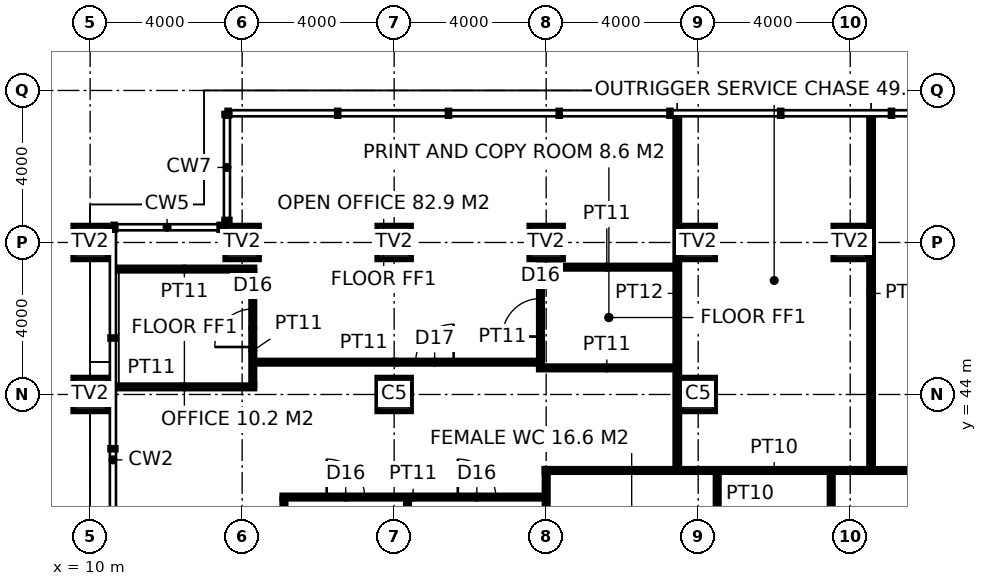
"""IFC4 building model, lengths in metres.
Left out: names, types, materials, properties, quantities, classifications, styles, units other than length and angle.
Written with IfcOpenShell. Run it as: python <this file> out.ifc"""

import sys

from ifc_helpers import new_model, si_unit, direction, frame, frame_2d, origin, origin_2d, place, context, subcontext, project, spatial, rectangle, hollow_rectangle, extrude, element, fill, save


model = new_model("IFC4")
c1 = context("Model", 3, precision=1e-05, world=origin(), true_north=direction((0.0, 1.0)))
c2 = subcontext(c1, "Body", "Model", "MODEL_VIEW")
j1 = project(units=[si_unit("LENGTHUNIT", "METRE"), si_unit("PLANEANGLEUNIT", "RADIAN")], contexts=[c1])
p1 = place(None, origin())
s1 = spatial("IfcSite", under=j1, at=p1, CompositionType="ELEMENT")
p2 = place(p1, origin())
s2 = spatial("IfcBuilding", under=s1, at=p2, CompositionType="ELEMENT")
p3 = place(p2, frame((0.0, 0.0, 105.4)))
s3 = spatial("IfcBuildingStorey", under=s2, at=p3, CompositionType="ELEMENT", Elevation=105.4)
for number, where, z_axis, x_axis in (
    (1, (10.0, 44.0, 0.0), (0.0, 0.0, 1.0), (1.0, 0.0, 0.0)),
    (2, (10.0, 48.0, 0.0), (0.0, 0.0, 1.0), (1.0, 0.0, 0.0)),
    (3, (14.0, 48.0, 0.0), (0.0, 0.0, 1.0), (1.0, 0.0, 0.0)),
    (4, (18.0, 48.0, 0.0), (0.0, 0.0, 1.0), (1.0, 0.0, 0.0)),
    (5, (22.0, 48.0, 0.0), (0.0, 0.0, 1.0), (1.0, 0.0, 0.0)),
    (6, (26.0, 48.0, 0.0), (0.0, 0.0, 1.0), (1.0, 0.0, 0.0)),
    (7, (30.0, 48.0, 0.0), (0.0, 0.0, 1.0), (1.0, 0.0, 0.0)),
):
    element("IfcColumn", number, at=place(p3, frame(where, z_axis=z_axis, x_axis=x_axis)), inside=s3, PredefinedType="USERDEFINED", context=c2, shape_type="SweptSolid", body=[
        extrude(hollow_rectangle(XDim=0.9, YDim=0.9, WallThickness=0.1, at=origin_2d()), origin(), (0.0, 0.0, 1.0), 4.0),
    ])
for number, where, z_axis, x_axis in (
    (8, (18.0, 44.0, 0.0), (0.0, 0.0, 1.0), (1.0, 0.0, 0.0)),
    (9, (26.0, 44.0, 0.0), (0.0, 0.0, 1.0), (1.0, 0.0, 0.0)),
):
    element("IfcColumn", number, at=place(p3, frame(where, z_axis=z_axis, x_axis=x_axis)), inside=s3, PredefinedType="COLUMN", context=c2, shape_type="SweptSolid", body=[
        extrude(hollow_rectangle(XDim=0.9, YDim=0.9, WallThickness=0.1, at=origin_2d()), origin(), (0.0, 0.0, 1.0), 4.0),
    ])
p4 = place(p3, frame((22.0, 38.375, 0.0), z_axis=(0.0, 0.0, 1.0), x_axis=(0.0, 1.0, 0.0)))
e10 = element("IfcWall", 10, at=p4, inside=s3, PredefinedType="PARTITIONING", context=c2, shape_type="SweptSolid", body=[
    extrude(rectangle(XDim=3.675, YDim=0.1, at=frame_2d((1.837, 0.0))), origin(), (0.0, 0.0, 1.0), 2.95),
])
p5 = place(p3, frame((21.95, 42.0, 0.0), z_axis=(0.0, 0.0, 1.0), x_axis=(1.0, 0.0, 0.0)))
e11 = element("IfcWall", 11, at=p5, inside=s3, PredefinedType="PARTITIONING", context=c2, shape_type="SweptSolid", body=[
    extrude(rectangle(XDim=12.1, YDim=0.1, at=frame_2d((6.05, 0.0))), origin(), (0.0, 0.0, 1.0), 3.85),
])
for number, where, z_axis, x_axis in (
    (12, (26.5, 38.375, 0.0), (0.0, 0.0, 1.0), (0.0, 1.0, 0.0)),
    (13, (29.5, 38.375, 0.0), (0.0, 0.0, 1.0), (0.0, 1.0, 0.0)),
):
    element("IfcWall", number, at=place(p3, frame(where, z_axis=z_axis, x_axis=x_axis)), inside=s3, PredefinedType="PARTITIONING", context=c2, shape_type="SweptSolid", body=[
        extrude(rectangle(XDim=3.575, YDim=0.1, at=frame_2d((1.788, 0.0))), origin(), (0.0, 0.0, 1.0), 3.85),
    ])
for number, where, z_axis, x_axis in (
    (14, (25.45, 42.0, 0.0), (0.0, 0.0, 1.0), (0.0, 1.0, 0.0)),
    (15, (30.55, 42.0, 0.0), (0.0, 0.0, 1.0), (0.0, 1.0, 0.0)),
):
    element("IfcWall", number, at=place(p3, frame(where, z_axis=z_axis, x_axis=x_axis)), inside=s3, PredefinedType="PARTITIONING", context=c2, shape_type="SweptSolid", body=[
        extrude(rectangle(XDim=9.32, YDim=0.12, at=frame_2d((4.66, 0.0))), origin(), (0.0, 0.0, 1.0), 3.85),
    ])
p6 = place(p3, frame((15.05, 41.3, 0.0), z_axis=(0.0, 0.0, 1.0), x_axis=(1.0, 0.0, 0.0)))
e16 = element("IfcWall", 16, at=p6, inside=s3, PredefinedType="PARTITIONING", context=c2, shape_type="SweptSolid", body=[
    extrude(rectangle(XDim=6.9, YDim=0.1, at=frame_2d((3.45, 0.0))), origin(), (0.0, 0.0, 1.0), 3.85),
])
p7 = place(p6, frame((1.175, 0.0, 0.0)))
e17 = element("IfcOpeningElement", 17, at=p7, cuts=e16, PredefinedType="OPENING", context=c2, shape_type="SweptSolid", body=[
    extrude(rectangle(XDim=1.0, YDim=2.2, at=frame_2d((0.5, 1.1))), frame((0.0, 0.06, 0.0), z_axis=(0.0, -1.0, 0.0), x_axis=(1.0, 0.0, 0.0)), (0.0, 0.0, 1.0), 0.12),
])
p8 = place(p6, frame((4.625, 0.0, 0.0)))
e18 = element("IfcOpeningElement", 18, at=p8, cuts=e16, PredefinedType="OPENING", context=c2, shape_type="SweptSolid", body=[
    extrude(rectangle(XDim=1.0, YDim=2.2, at=frame_2d((0.5, 1.1))), frame((0.0, 0.06, 0.0), z_axis=(0.0, -1.0, 0.0), x_axis=(1.0, 0.0, 0.0)), (0.0, 0.0, 1.0), 0.12),
])
p9 = place(p3, frame((10.63, 44.2, 0.0), z_axis=(0.0, 0.0, 1.0), x_axis=(1.0, 0.0, 0.0)))
e19 = element("IfcWall", 19, at=p9, inside=s3, PredefinedType="PARTITIONING", context=c2, shape_type="SweptSolid", body=[
    extrude(rectangle(XDim=3.7, YDim=0.1, at=frame_2d((1.85, 0.0))), origin(), (0.0, 0.0, 1.0), 3.85),
])
p10 = place(p3, frame((21.8, 44.7, 0.0), z_axis=(0.0, 0.0, 1.0), x_axis=(1.0, 0.0, 0.0)))
e20 = element("IfcWall", 20, at=p10, inside=s3, PredefinedType="PARTITIONING", context=c2, shape_type="SweptSolid", body=[
    extrude(rectangle(XDim=3.59, YDim=0.1, at=frame_2d((1.795, 0.0))), origin(), (0.0, 0.0, 1.0), 3.85),
])
p11 = place(p3, frame((10.63, 47.3, 0.0), z_axis=(0.0, 0.0, 1.0), x_axis=(1.0, 0.0, 0.0)))
e21 = element("IfcWall", 21, at=p11, inside=s3, PredefinedType="PARTITIONING", context=c2, shape_type="SweptSolid", body=[
    extrude(rectangle(XDim=3.7, YDim=0.1, at=frame_2d((1.85, 0.0))), origin(), (0.0, 0.0, 1.0), 3.85),
])
p12 = place(p3, frame((21.8, 47.35, 0.0), z_axis=(0.0, 0.0, 1.0), x_axis=(1.0, 0.0, 0.0)))
e22 = element("IfcWall", 22, at=p12, inside=s3, PredefinedType="PARTITIONING", context=c2, shape_type="SweptSolid", body=[
    extrude(rectangle(XDim=3.59, YDim=0.1, at=frame_2d((1.795, 0.0))), origin(), (0.0, 0.0, 1.0), 3.85),
])
p13 = place(p3, frame((14.28, 44.25, 0.0), z_axis=(0.0, 0.0, 1.0), x_axis=(0.0, 1.0, 0.0)))
e23 = element("IfcWall", 23, at=p13, inside=s3, PredefinedType="PARTITIONING", context=c2, shape_type="SweptSolid", body=[
    extrude(rectangle(XDim=3.0, YDim=0.1, at=frame_2d((1.5, 0.0))), origin(), (0.0, 0.0, 1.0), 2.65),
])
p14 = place(p13, frame((1.0, 0.0, 0.0)))
e24 = element("IfcOpeningElement", 24, at=p14, cuts=e23, PredefinedType="OPENING", context=c2, shape_type="SweptSolid", body=[
    extrude(rectangle(XDim=1.0, YDim=2.2, at=frame_2d((0.5, 1.1))), frame((0.0, 0.06, 0.0), z_axis=(0.0, -1.0, 0.0), x_axis=(1.0, 0.0, 0.0)), (0.0, 0.0, 1.0), 0.12),
])
p15 = place(p3, frame((15.1, 38.375, 0.0), z_axis=(0.0, 0.0, 1.0), x_axis=(0.0, 1.0, 0.0)))
e25 = element("IfcWall", 25, at=p15, inside=s3, PredefinedType="PARTITIONING", context=c2, shape_type="SweptSolid", body=[
    extrude(rectangle(XDim=2.875, YDim=0.1, at=frame_2d((1.438, 0.0))), origin(), (0.0, 0.0, 1.0), 3.85),
])
p16 = place(p3, frame((18.35, 38.375, 0.0), z_axis=(0.0, 0.0, 1.0), x_axis=(0.0, 1.0, 0.0)))
e26 = element("IfcWall", 26, at=p16, inside=s3, PredefinedType="PARTITIONING", context=c2, shape_type="SweptSolid", body=[
    extrude(rectangle(XDim=2.875, YDim=0.1, at=frame_2d((1.438, 0.0))), origin(), (0.0, 0.0, 1.0), 2.65),
])
p17 = place(p3, frame((21.85, 44.75, 0.0), z_axis=(0.0, 0.0, 1.0), x_axis=(0.0, 1.0, 0.0)))
e27 = element("IfcWall", 27, at=p17, inside=s3, PredefinedType="PARTITIONING", context=c2, shape_type="SweptSolid", body=[
    extrude(rectangle(XDim=2.55, YDim=0.1, at=frame_2d((1.275, 0.0))), origin(), (0.0, 0.0, 1.0), 2.95),
])
p18 = place(p17, frame((0.775, 0.0, 0.0)))
e28 = element("IfcOpeningElement", 28, at=p18, cuts=e27, PredefinedType="OPENING", context=c2, shape_type="SweptSolid", body=[
    extrude(rectangle(XDim=1.0, YDim=2.2, at=frame_2d((0.5, 1.1))), frame((0.0, 0.06, 0.0), z_axis=(0.0, -1.0, 0.0), x_axis=(1.0, 0.0, 0.0)), (0.0, 0.0, 1.0), 0.12),
])
p19 = place(p3, frame((14.33, 44.85, 0.0), z_axis=(0.0, 0.0, 1.0), x_axis=(1.0, 0.0, 0.0)))
e29 = element("IfcWall", 29, at=p19, inside=s3, PredefinedType="PARTITIONING", context=c2, shape_type="SweptSolid", body=[
    extrude(rectangle(XDim=7.47, YDim=0.1, at=frame_2d((3.735, 0.0))), origin(), (0.0, 0.0, 1.0), 3.85),
])
p20 = place(p19, frame((4.235, 0.0, 0.0)))
e30 = element("IfcOpeningElement", 30, at=p20, cuts=e29, PredefinedType="OPENING", context=c2, shape_type="SweptSolid", body=[
    extrude(rectangle(XDim=1.0, YDim=2.2, at=frame_2d((0.5, 1.1))), frame((0.0, 0.06, 0.0), z_axis=(0.0, -1.0, 0.0), x_axis=(1.0, 0.0, 0.0)), (0.0, 0.0, 1.0), 0.12),
])
p21 = place(p7, origin())
e31 = element("IfcDoor", 31, at=p21, inside=s3, OperationType="SINGLE_SWING_LEFT", PredefinedType="DOOR", context=c2, shape_type="SweptSolid", body=[
    extrude(rectangle(XDim=1.0, YDim=2.2, at=frame_2d((0.5, 1.1))), frame((0.0, 0.025, 0.0), z_axis=(0.0, -1.0, 0.0), x_axis=(1.0, 0.0, 0.0)), (0.0, 0.0, 1.0), 0.05),
])
fill(e17, e31)
p22 = place(p8, origin())
e32 = element("IfcDoor", 32, at=p22, inside=s3, OperationType="SINGLE_SWING_LEFT", PredefinedType="DOOR", context=c2, shape_type="SweptSolid", body=[
    extrude(rectangle(XDim=1.0, YDim=2.2, at=frame_2d((0.5, 1.1))), frame((0.0, 0.025, 0.0), z_axis=(0.0, -1.0, 0.0), x_axis=(1.0, 0.0, 0.0)), (0.0, 0.0, 1.0), 0.05),
])
fill(e18, e32)
p23 = place(p18, origin())
e33 = element("IfcDoor", 33, at=p23, inside=s3, OperationType="SINGLE_SWING_LEFT", PredefinedType="DOOR", context=c2, shape_type="SweptSolid", body=[
    extrude(rectangle(XDim=1.0, YDim=2.2, at=frame_2d((0.5, 1.1))), frame((0.0, 0.025, 0.0), z_axis=(0.0, -1.0, 0.0), x_axis=(1.0, 0.0, 0.0)), (0.0, 0.0, 1.0), 0.05),
])
fill(e28, e33)
p24 = place(p14, origin())
e34 = element("IfcDoor", 34, at=p24, inside=s3, OperationType="SINGLE_SWING_LEFT", PredefinedType="DOOR", context=c2, shape_type="SweptSolid", body=[
    extrude(rectangle(XDim=1.0, YDim=2.2, at=frame_2d((0.5, 1.1))), frame((0.0, 0.025, 0.0), z_axis=(0.0, -1.0, 0.0), x_axis=(1.0, 0.0, 0.0)), (0.0, 0.0, 1.0), 0.05),
])
fill(e24, e34)
p25 = place(p20, origin())
e35 = element("IfcDoor", 35, at=p25, inside=s3, OperationType="SINGLE_SWING_RIGHT", PredefinedType="DOOR", context=c2, shape_type="SweptSolid", body=[
    extrude(rectangle(XDim=1.0, YDim=2.2, at=frame_2d((0.5, 1.1))), frame((0.0, 0.025, 0.0), z_axis=(0.0, -1.0, 0.0), x_axis=(1.0, 0.0, 0.0)), (0.0, 0.0, 1.0), 0.05),
])
fill(e30, e35)
save(model, sys.argv[1])
